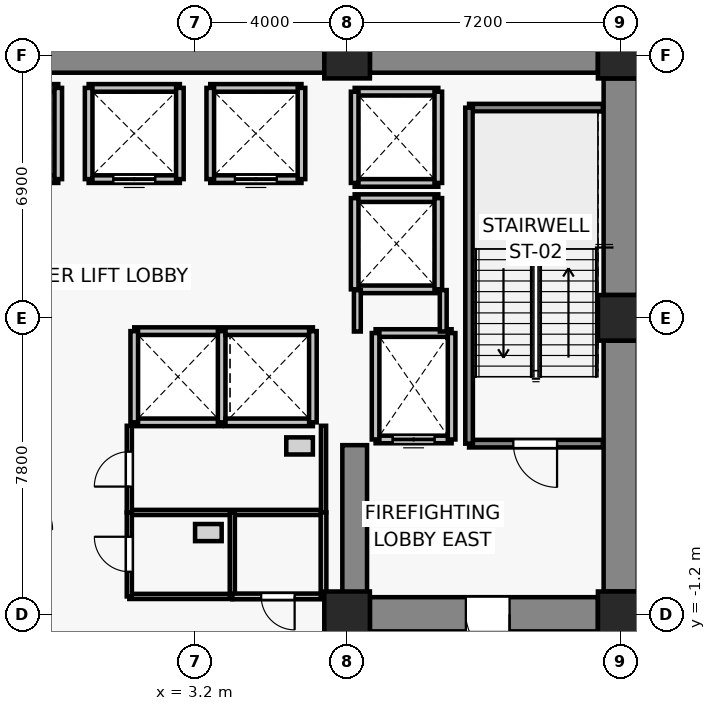
"""IFC4 building model, lengths in metres.
Left out: names, types, materials, properties, quantities, classifications, styles, units other than length and angle.
Written with IfcOpenShell. Run it as: python <this file> out.ifc"""

import sys

from ifc_helpers import new_model, si_unit, direction, frame, frame_2d, origin, origin_2d, place, context, subcontext, project, spatial, rectangle, extrude, source, transform, mapped, element, fill, save


model = new_model("IFC4")
c1 = context("Model", 3, precision=1e-05, world=origin(), true_north=direction((0.0, 1.0)))
c2 = subcontext(c1, "Body", "Model", "MODEL_VIEW")
j1 = project(units=[si_unit("LENGTHUNIT", "METRE"), si_unit("PLANEANGLEUNIT", "RADIAN")], contexts=[c1])
p1 = place(None, origin())
s1 = spatial("IfcSite", under=j1, at=p1, CompositionType="ELEMENT")
p2 = place(p1, origin())
s2 = spatial("IfcBuilding", under=s1, at=p2, CompositionType="ELEMENT")
p3 = place(p2, frame((0.0, 0.0, 5.0)))
s3 = spatial("IfcBuildingStorey", under=s2, at=p3, CompositionType="ELEMENT", Elevation=5.0)
for number, where, z_axis, x_axis in (
    (1, (7.2, -1.2, 0.0), (0.0, 0.0, 1.0), (1.0, 0.0, 0.0)),
    (2, (14.4, -1.2, 0.0), (0.0, 0.0, 1.0), (1.0, 0.0, 0.0)),
    (3, (14.4, 6.6, 0.0), (0.0, 0.0, 1.0), (1.0, 0.0, 0.0)),
    (4, (7.2, 13.5, 0.0), (0.0, 0.0, 1.0), (1.0, 0.0, 0.0)),
    (5, (14.4, 13.5, 0.0), (0.0, 0.0, 1.0), (1.0, 0.0, 0.0)),
):
    element("IfcColumn", number, at=place(p3, frame(where, z_axis=z_axis, x_axis=x_axis)), inside=s3, PredefinedType="COLUMN", context=c2, shape_type="SweptSolid", body=[
        extrude(rectangle(XDim=1.2, YDim=1.2, at=origin_2d()), origin(), (0.0, 0.0, 1.0), 4.4),
    ])
p4 = place(p3, frame((-6.6, 13.5, 0.0), z_axis=(0.0, 0.0, 1.0), x_axis=(1.0, 0.0, 0.0)))
e6 = element("IfcWall", 6, at=p4, inside=s3, PredefinedType="SHEAR", context=c2, shape_type="SweptSolid", body=[
    extrude(rectangle(XDim=13.2, YDim=0.9, at=frame_2d((6.6, 0.0))), origin(), (0.0, 0.0, 1.0), 4.1),
])
p5 = place(p3, frame((7.8, 13.5, 0.0), z_axis=(0.0, 0.0, 1.0), x_axis=(1.0, 0.0, 0.0)))
e7 = element("IfcWall", 7, at=p5, inside=s3, PredefinedType="SHEAR", context=c2, shape_type="SweptSolid", body=[
    extrude(rectangle(XDim=6.0, YDim=0.9, at=frame_2d((3.0, 0.0))), origin(), (0.0, 0.0, 1.0), 4.1),
])
p6 = place(p3, frame((14.4, -0.6, 0.0), z_axis=(0.0, 0.0, 1.0), x_axis=(0.0, 1.0, 0.0)))
e8 = element("IfcWall", 8, at=p6, inside=s3, PredefinedType="SHEAR", context=c2, shape_type="SweptSolid", body=[
    extrude(rectangle(XDim=6.6, YDim=0.9, at=frame_2d((3.3, 0.0))), origin(), (0.0, 0.0, 1.0), 4.1),
])
p7 = place(p3, frame((14.4, 7.2, 0.0), z_axis=(0.0, 0.0, 1.0), x_axis=(0.0, 1.0, 0.0)))
e9 = element("IfcWall", 9, at=p7, inside=s3, PredefinedType="SHEAR", context=c2, shape_type="SweptSolid", body=[
    extrude(rectangle(XDim=5.7, YDim=0.9, at=frame_2d((2.85, 0.0))), origin(), (0.0, 0.0, 1.0), 4.1),
])
p8 = place(p3, frame((13.8, -1.2, 0.0), z_axis=(0.0, 0.0, 1.0), x_axis=(-1.0, 0.0, 0.0)))
e10 = element("IfcWall", 10, at=p8, inside=s3, PredefinedType="SHEAR", context=c2, shape_type="SweptSolid", body=[
    extrude(rectangle(XDim=6.0, YDim=0.9, at=frame_2d((3.0, 0.0))), origin(), (0.0, 0.0, 1.0), 4.1),
])
p9 = place(p8, frame((2.325, 0.0, 0.0)))
e11 = element("IfcOpeningElement", 11, at=p9, cuts=e10, PredefinedType="OPENING", context=c2, shape_type="SweptSolid", body=[
    extrude(rectangle(XDim=1.15, YDim=2.15, at=frame_2d((0.575, 1.075))), frame((0.0, 0.46, 0.0), z_axis=(0.0, -1.0, 0.0), x_axis=(1.0, 0.0, 0.0)), (0.0, 0.0, 1.0), 0.92),
])
p10 = place(p3, frame((7.4, -0.75, 0.0), z_axis=(0.0, 0.0, 1.0), x_axis=(0.0, 1.0, 0.0)))
e12 = element("IfcWall", 12, at=p10, inside=s3, PredefinedType="SHEAR", context=c2, shape_type="SweptSolid", body=[
    extrude(rectangle(XDim=4.0, YDim=0.65, at=frame_2d((2.0, 0.0))), origin(), (0.0, 0.0, 1.0), 4.1),
])
p11 = place(p3, frame((9.95, 3.4, 0.0), z_axis=(0.0, 0.0, 1.0), x_axis=(-1.0, 0.0, 0.0)))
e13 = element("IfcWall", 13, at=p11, inside=s3, PredefinedType="SOLIDWALL", context=c2, shape_type="SweptSolid", body=[
    extrude(rectangle(XDim=2.0, YDim=0.2, at=frame_2d((1.0, 0.0))), origin(), (0.0, 0.0, 1.0), 4.1),
])
p12 = place(p11, frame((0.45, 0.0, 0.0)))
e14 = element("IfcOpeningElement", 14, at=p12, cuts=e13, PredefinedType="OPENING", context=c2, shape_type="SweptSolid", body=[
    extrude(rectangle(XDim=1.1, YDim=2.2, at=frame_2d((0.55, 1.1))), frame((0.0, 0.11, 0.0), z_axis=(0.0, -1.0, 0.0), x_axis=(1.0, 0.0, 0.0)), (0.0, 0.0, 1.0), 0.22),
])
p13 = place(p3, frame((7.95, 6.2, 0.0), z_axis=(0.0, 0.0, 1.0), x_axis=(1.0, 0.0, 0.0)))
e15 = element("IfcWall", 15, at=p13, inside=s3, PredefinedType="SOLIDWALL", context=c2, shape_type="SweptSolid", body=[
    extrude(rectangle(XDim=2.0, YDim=0.2, at=frame_2d((1.0, 0.0))), origin(), (0.0, 0.0, 1.0), 4.1),
])
for number, where, z_axis, x_axis in (
    (16, (7.95, 3.4, 0.0), (0.0, 0.0, 1.0), (0.0, 1.0, 0.0)),
    (17, (9.95, 6.2, 0.0), (0.0, 0.0, 1.0), (0.0, -1.0, 0.0)),
):
    element("IfcWall", number, at=place(p3, frame(where, z_axis=z_axis, x_axis=x_axis)), inside=s3, PredefinedType="SOLIDWALL", context=c2, shape_type="SweptSolid", body=[
        extrude(rectangle(XDim=2.8, YDim=0.2, at=frame_2d((1.4, 0.0))), origin(), (0.0, 0.0, 1.0), 4.1),
    ])
p14 = place(p3, frame((-0.4, 10.25, 0.0), z_axis=(0.0, 0.0, 1.0), x_axis=(-1.0, 0.0, 0.0)))
e18 = element("IfcWall", 18, at=p14, inside=s3, PredefinedType="SOLIDWALL", context=c2, shape_type="SweptSolid", body=[
    extrude(rectangle(XDim=2.4, YDim=0.2, at=frame_2d((1.2, 0.0))), origin(), (0.0, 0.0, 1.0), 4.1),
])
p15 = place(p14, frame((0.65, 0.0, 0.0)))
e19 = element("IfcOpeningElement", 19, at=p15, cuts=e18, PredefinedType="OPENING", context=c2, shape_type="SweptSolid", body=[
    extrude(rectangle(XDim=1.1, YDim=2.2, at=frame_2d((0.55, 1.1))), frame((0.0, 0.11, 0.0), z_axis=(0.0, -1.0, 0.0), x_axis=(1.0, 0.0, 0.0)), (0.0, 0.0, 1.0), 0.22),
])
p16 = place(p3, frame((-2.8, 12.65, 0.0), z_axis=(0.0, 0.0, 1.0), x_axis=(1.0, 0.0, 0.0)))
e20 = element("IfcWall", 20, at=p16, inside=s3, PredefinedType="SOLIDWALL", context=c2, shape_type="SweptSolid", body=[
    extrude(rectangle(XDim=2.4, YDim=0.2, at=frame_2d((1.2, 0.0))), origin(), (0.0, 0.0, 1.0), 4.1),
])
p17 = place(p3, frame((-0.4, 12.65, 0.0), z_axis=(0.0, 0.0, 1.0), x_axis=(0.0, -1.0, 0.0)))
e21 = element("IfcWall", 21, at=p17, inside=s3, PredefinedType="SOLIDWALL", context=c2, shape_type="SweptSolid", body=[
    extrude(rectangle(XDim=2.4, YDim=0.2, at=frame_2d((1.2, 0.0))), origin(), (0.0, 0.0, 1.0), 4.1),
])
p18 = place(p3, frame((2.8, 10.25, 0.0), z_axis=(0.0, 0.0, 1.0), x_axis=(-1.0, 0.0, 0.0)))
e22 = element("IfcWall", 22, at=p18, inside=s3, PredefinedType="SOLIDWALL", context=c2, shape_type="SweptSolid", body=[
    extrude(rectangle(XDim=2.4, YDim=0.2, at=frame_2d((1.2, 0.0))), origin(), (0.0, 0.0, 1.0), 4.1),
])
p19 = place(p18, frame((0.65, 0.0, 0.0)))
e23 = element("IfcOpeningElement", 23, at=p19, cuts=e22, PredefinedType="OPENING", context=c2, shape_type="SweptSolid", body=[
    extrude(rectangle(XDim=1.1, YDim=2.2, at=frame_2d((0.55, 1.1))), frame((0.0, 0.11, 0.0), z_axis=(0.0, -1.0, 0.0), x_axis=(1.0, 0.0, 0.0)), (0.0, 0.0, 1.0), 0.22),
])
p20 = place(p3, frame((0.4, 12.65, 0.0), z_axis=(0.0, 0.0, 1.0), x_axis=(1.0, 0.0, 0.0)))
e24 = element("IfcWall", 24, at=p20, inside=s3, PredefinedType="SOLIDWALL", context=c2, shape_type="SweptSolid", body=[
    extrude(rectangle(XDim=2.4, YDim=0.2, at=frame_2d((1.2, 0.0))), origin(), (0.0, 0.0, 1.0), 4.1),
])
for number, where, z_axis, x_axis in (
    (25, (0.4, 10.25, 0.0), (0.0, 0.0, 1.0), (0.0, 1.0, 0.0)),
    (26, (2.8, 12.65, 0.0), (0.0, 0.0, 1.0), (0.0, -1.0, 0.0)),
):
    element("IfcWall", number, at=place(p3, frame(where, z_axis=z_axis, x_axis=x_axis)), inside=s3, PredefinedType="SOLIDWALL", context=c2, shape_type="SweptSolid", body=[
        extrude(rectangle(XDim=2.4, YDim=0.2, at=frame_2d((1.2, 0.0))), origin(), (0.0, 0.0, 1.0), 4.1),
    ])
p21 = place(p3, frame((6.0, 10.25, 0.0), z_axis=(0.0, 0.0, 1.0), x_axis=(-1.0, 0.0, 0.0)))
e27 = element("IfcWall", 27, at=p21, inside=s3, PredefinedType="SOLIDWALL", context=c2, shape_type="SweptSolid", body=[
    extrude(rectangle(XDim=2.4, YDim=0.2, at=frame_2d((1.2, 0.0))), origin(), (0.0, 0.0, 1.0), 4.1),
])
p22 = place(p21, frame((0.65, 0.0, 0.0)))
e28 = element("IfcOpeningElement", 28, at=p22, cuts=e27, PredefinedType="OPENING", context=c2, shape_type="SweptSolid", body=[
    extrude(rectangle(XDim=1.1, YDim=2.2, at=frame_2d((0.55, 1.1))), frame((0.0, 0.11, 0.0), z_axis=(0.0, -1.0, 0.0), x_axis=(1.0, 0.0, 0.0)), (0.0, 0.0, 1.0), 0.22),
])
for number, where, z_axis, x_axis in (
    (29, (3.6, 12.65, 0.0), (0.0, 0.0, 1.0), (1.0, 0.0, 0.0)),
    (30, (3.6, 10.25, 0.0), (0.0, 0.0, 1.0), (0.0, 1.0, 0.0)),
    (31, (6.0, 12.65, 0.0), (0.0, 0.0, 1.0), (0.0, -1.0, 0.0)),
):
    element("IfcWall", number, at=place(p3, frame(where, z_axis=z_axis, x_axis=x_axis)), inside=s3, PredefinedType="SOLIDWALL", context=c2, shape_type="SweptSolid", body=[
        extrude(rectangle(XDim=2.4, YDim=0.2, at=frame_2d((1.2, 0.0))), origin(), (0.0, 0.0, 1.0), 4.1),
    ])
for number, where, z_axis, x_axis in (
    (32, (3.9, 3.85, 0.0), (0.0, 0.0, 1.0), (-1.0, 0.0, 0.0)),
    (33, (1.6, 6.25, 0.0), (0.0, 0.0, 1.0), (1.0, 0.0, 0.0)),
):
    element("IfcWall", number, at=place(p3, frame(where, z_axis=z_axis, x_axis=x_axis)), inside=s3, PredefinedType="SOLIDWALL", context=c2, shape_type="SweptSolid", body=[
        extrude(rectangle(XDim=2.3, YDim=0.2, at=frame_2d((1.15, 0.0))), origin(), (0.0, 0.0, 1.0), 4.1),
    ])
for number, where, z_axis, x_axis in (
    (34, (1.6, 3.85, 0.0), (0.0, 0.0, 1.0), (0.0, 1.0, 0.0)),
    (35, (3.9, 6.25, 0.0), (0.0, 0.0, 1.0), (0.0, -1.0, 0.0)),
):
    element("IfcWall", number, at=place(p3, frame(where, z_axis=z_axis, x_axis=x_axis)), inside=s3, PredefinedType="SOLIDWALL", context=c2, shape_type="SweptSolid", body=[
        extrude(rectangle(XDim=2.4, YDim=0.2, at=frame_2d((1.2, 0.0))), origin(), (0.0, 0.0, 1.0), 4.1),
    ])
for number, where, z_axis, x_axis in (
    (36, (6.3, 3.85, 0.0), (0.0, 0.0, 1.0), (-1.0, 0.0, 0.0)),
    (37, (4.0, 6.25, 0.0), (0.0, 0.0, 1.0), (1.0, 0.0, 0.0)),
):
    element("IfcWall", number, at=place(p3, frame(where, z_axis=z_axis, x_axis=x_axis)), inside=s3, PredefinedType="SOLIDWALL", context=c2, shape_type="SweptSolid", body=[
        extrude(rectangle(XDim=2.3, YDim=0.2, at=frame_2d((1.15, 0.0))), origin(), (0.0, 0.0, 1.0), 4.1),
    ])
p23 = place(p3, frame((6.3, 6.25, 0.0), z_axis=(0.0, 0.0, 1.0), x_axis=(0.0, -1.0, 0.0)))
e38 = element("IfcWall", 38, at=p23, inside=s3, PredefinedType="SOLIDWALL", context=c2, shape_type="SweptSolid", body=[
    extrude(rectangle(XDim=2.4, YDim=0.2, at=frame_2d((1.2, 0.0))), origin(), (0.0, 0.0, 1.0), 4.1),
])
for number, where, z_axis, x_axis in (
    (39, (9.6, 7.35, 0.0), (0.0, 0.0, 1.0), (-1.0, 0.0, 0.0)),
    (40, (7.4, 9.75, 0.0), (0.0, 0.0, 1.0), (1.0, 0.0, 0.0)),
):
    element("IfcWall", number, at=place(p3, frame(where, z_axis=z_axis, x_axis=x_axis)), inside=s3, PredefinedType="SOLIDWALL", context=c2, shape_type="SweptSolid", body=[
        extrude(rectangle(XDim=2.2, YDim=0.2, at=frame_2d((1.1, 0.0))), origin(), (0.0, 0.0, 1.0), 3.19),
    ])
p24 = place(p3, frame((7.4, 7.35, 0.0), z_axis=(0.0, 0.0, 1.0), x_axis=(0.0, 1.0, 0.0)))
e41 = element("IfcWall", 41, at=p24, inside=s3, PredefinedType="SOLIDWALL", context=c2, shape_type="SweptSolid", body=[
    extrude(rectangle(XDim=2.4, YDim=0.2, at=frame_2d((1.2, 0.0))), origin(), (0.0, 0.0, 1.0), 3.19),
])
p25 = place(p3, frame((9.6, 9.75, 0.0), z_axis=(0.0, 0.0, 1.0), x_axis=(0.0, -1.0, 0.0)))
e42 = element("IfcWall", 42, at=p25, inside=s3, PredefinedType="SOLIDWALL", context=c2, shape_type="SweptSolid", body=[
    extrude(rectangle(XDim=2.4, YDim=0.2, at=frame_2d((1.2, 0.0))), origin(), (0.0, 0.0, 1.0), 4.1),
])
for number, where, z_axis, x_axis in (
    (43, (9.6, 10.15, 0.0), (0.0, 0.0, 1.0), (-1.0, 0.0, 0.0)),
    (44, (7.4, 12.55, 0.0), (0.0, 0.0, 1.0), (1.0, 0.0, 0.0)),
):
    element("IfcWall", number, at=place(p3, frame(where, z_axis=z_axis, x_axis=x_axis)), inside=s3, PredefinedType="SOLIDWALL", context=c2, shape_type="SweptSolid", body=[
        extrude(rectangle(XDim=2.2, YDim=0.2, at=frame_2d((1.1, 0.0))), origin(), (0.0, 0.0, 1.0), 3.19),
    ])
p26 = place(p3, frame((7.4, 10.15, 0.0), z_axis=(0.0, 0.0, 1.0), x_axis=(0.0, 1.0, 0.0)))
e45 = element("IfcWall", 45, at=p26, inside=s3, PredefinedType="SOLIDWALL", context=c2, shape_type="SweptSolid", body=[
    extrude(rectangle(XDim=2.4, YDim=0.2, at=frame_2d((1.2, 0.0))), origin(), (0.0, 0.0, 1.0), 3.19),
])
p27 = place(p3, frame((9.6, 12.55, 0.0), z_axis=(0.0, 0.0, 1.0), x_axis=(0.0, -1.0, 0.0)))
e46 = element("IfcWall", 46, at=p27, inside=s3, PredefinedType="SOLIDWALL", context=c2, shape_type="SweptSolid", body=[
    extrude(rectangle(XDim=2.4, YDim=0.2, at=frame_2d((1.2, 0.0))), origin(), (0.0, 0.0, 1.0), 4.1),
])
p28 = place(p3, frame((13.93, 3.29, 0.0), z_axis=(0.0, 0.0, 1.0), x_axis=(-1.0, 0.0, 0.0)))
e47 = element("IfcWall", 47, at=p28, inside=s3, PredefinedType="SOLIDWALL", context=c2, shape_type="SweptSolid", body=[
    extrude(rectangle(XDim=3.52, YDim=0.2, at=frame_2d((1.76, 0.0))), origin(), (0.0, 0.0, 1.0), 4.1),
])
p29 = place(p28, frame((1.205, 0.0, 0.0)))
e48 = element("IfcOpeningElement", 48, at=p29, cuts=e47, PredefinedType="OPENING", context=c2, shape_type="SweptSolid", body=[
    extrude(rectangle(XDim=1.15, YDim=2.15, at=frame_2d((0.575, 1.075))), frame((0.0, 0.11, 0.0), z_axis=(0.0, -1.0, 0.0), x_axis=(1.0, 0.0, 0.0)), (0.0, 0.0, 1.0), 0.22),
])
p30 = place(p3, frame((10.41, 12.13, 0.0), z_axis=(0.0, 0.0, 1.0), x_axis=(1.0, 0.0, 0.0)))
e49 = element("IfcWall", 49, at=p30, inside=s3, PredefinedType="SOLIDWALL", context=c2, shape_type="SweptSolid", body=[
    extrude(rectangle(XDim=3.52, YDim=0.2, at=frame_2d((1.76, 0.0))), origin(), (0.0, 0.0, 1.0), 4.1),
])
p31 = place(p3, frame((10.41, 3.29, 0.0), z_axis=(0.0, 0.0, 1.0), x_axis=(0.0, 1.0, 0.0)))
e50 = element("IfcWall", 50, at=p31, inside=s3, PredefinedType="SOLIDWALL", context=c2, shape_type="SweptSolid", body=[
    extrude(rectangle(XDim=8.84, YDim=0.2, at=frame_2d((4.42, 0.0))), origin(), (0.0, 0.0, 1.0), 4.1),
])
p32 = place(p3, frame((7.47, 6.24, 0.0), z_axis=(0.0, 0.0, 1.0), x_axis=(0.0, 1.0, 0.0)))
e51 = element("IfcWall", 51, at=p32, inside=s3, PredefinedType="PARTITIONING", context=c2, shape_type="SweptSolid", body=[
    extrude(rectangle(XDim=1.09, YDim=0.18, at=frame_2d((0.545, 0.0))), origin(), (0.0, 0.0, 1.0), 3.19),
])
p33 = place(p3, frame((9.73, 7.33, 0.0), z_axis=(0.0, 0.0, 1.0), x_axis=(0.0, -1.0, 0.0)))
e52 = element("IfcWall", 52, at=p33, inside=s3, PredefinedType="PARTITIONING", context=c2, shape_type="SweptSolid", body=[
    extrude(rectangle(XDim=1.09, YDim=0.18, at=frame_2d((0.545, 0.0))), origin(), (0.0, 0.0, 1.0), 4.1),
])
p34 = place(p3, frame((6.58, 1.48, 0.0), z_axis=(0.0, 0.0, 1.0), x_axis=(-1.0, 0.0, 0.0)))
e53 = element("IfcWall", 53, at=p34, inside=s3, PredefinedType="PARTITIONING", context=c2, shape_type="SweptSolid", body=[
    extrude(rectangle(XDim=5.11, YDim=0.135, at=frame_2d((2.555, 0.0))), origin(), (0.0, 0.0, 1.0), 4.1),
])
p35 = place(p3, frame((1.47, 1.48, 0.0), z_axis=(0.0, 0.0, 1.0), x_axis=(0.0, 1.0, 0.0)))
e54 = element("IfcWall", 54, at=p35, inside=s3, PredefinedType="PARTITIONING", context=c2, shape_type="SweptSolid", body=[
    extrude(rectangle(XDim=2.28, YDim=0.135, at=frame_2d((1.14, 0.0))), origin(), (0.0, 0.0, 1.0), 3.473),
])
p36 = place(p35, frame((0.68, 0.0, 0.0)))
e55 = element("IfcOpeningElement", 55, at=p36, cuts=e54, PredefinedType="OPENING", context=c2, shape_type="SweptSolid", body=[
    extrude(rectangle(XDim=0.92, YDim=2.1, at=frame_2d((0.46, 1.05))), frame((0.0, 0.077, 0.0), z_axis=(0.0, -1.0, 0.0), x_axis=(1.0, 0.0, 0.0)), (0.0, 0.0, 1.0), 0.155),
])
p37 = place(p3, frame((6.58, 3.76, 0.0), z_axis=(0.0, 0.0, 1.0), x_axis=(0.0, -1.0, 0.0)))
e56 = element("IfcWall", 56, at=p37, inside=s3, PredefinedType="PARTITIONING", context=c2, shape_type="SweptSolid", body=[
    extrude(rectangle(XDim=2.28, YDim=0.135, at=frame_2d((1.14, 0.0))), origin(), (0.0, 0.0, 1.0), 3.473),
])
p38 = place(p3, frame((4.18, -0.73, 0.0), z_axis=(0.0, 0.0, 1.0), x_axis=(-1.0, 0.0, 0.0)))
e57 = element("IfcWall", 57, at=p38, inside=s3, PredefinedType="PARTITIONING", context=c2, shape_type="SweptSolid", body=[
    extrude(rectangle(XDim=2.71, YDim=0.135, at=frame_2d((1.355, 0.0))), origin(), (0.0, 0.0, 1.0), 4.1),
])
p39 = place(p3, frame((1.47, -0.73, 0.0), z_axis=(0.0, 0.0, 1.0), x_axis=(0.0, 1.0, 0.0)))
e58 = element("IfcWall", 58, at=p39, inside=s3, PredefinedType="PARTITIONING", context=c2, shape_type="SweptSolid", body=[
    extrude(rectangle(XDim=2.21, YDim=0.135, at=frame_2d((1.105, 0.0))), origin(), (0.0, 0.0, 1.0), 4.1),
])
p40 = place(p39, frame((0.65, 0.0, 0.0)))
e59 = element("IfcOpeningElement", 59, at=p40, cuts=e58, PredefinedType="OPENING", context=c2, shape_type="SweptSolid", body=[
    extrude(rectangle(XDim=0.92, YDim=2.1, at=frame_2d((0.46, 1.05))), frame((0.0, 0.077, 0.0), z_axis=(0.0, -1.0, 0.0), x_axis=(1.0, 0.0, 0.0)), (0.0, 0.0, 1.0), 0.155),
])
p41 = place(p3, frame((4.18, 1.48, 0.0), z_axis=(0.0, 0.0, 1.0), x_axis=(0.0, -1.0, 0.0)))
e60 = element("IfcWall", 60, at=p41, inside=s3, PredefinedType="PARTITIONING", context=c2, shape_type="SweptSolid", body=[
    extrude(rectangle(XDim=2.21, YDim=0.135, at=frame_2d((1.105, 0.0))), origin(), (0.0, 0.0, 1.0), 4.1),
])
p42 = place(p3, frame((6.58, -0.73, 0.0), z_axis=(0.0, 0.0, 1.0), x_axis=(-1.0, 0.0, 0.0)))
e61 = element("IfcWall", 61, at=p42, inside=s3, PredefinedType="PARTITIONING", context=c2, shape_type="SweptSolid", body=[
    extrude(rectangle(XDim=2.4, YDim=0.15, at=frame_2d((1.2, 0.0))), origin(), (0.0, 0.0, 1.0), 4.1),
])
p43 = place(p42, frame((0.76, 0.0, 0.0)))
e62 = element("IfcOpeningElement", 62, at=p43, cuts=e61, PredefinedType="OPENING", context=c2, shape_type="SweptSolid", body=[
    extrude(rectangle(XDim=0.88, YDim=2.1, at=frame_2d((0.44, 1.05))), frame((0.0, 0.085, 0.0), z_axis=(0.0, -1.0, 0.0), x_axis=(1.0, 0.0, 0.0)), (0.0, 0.0, 1.0), 0.17),
])
p44 = place(p3, frame((6.58, 1.48, 0.0), z_axis=(0.0, 0.0, 1.0), x_axis=(0.0, -1.0, 0.0)))
e63 = element("IfcWall", 63, at=p44, inside=s3, PredefinedType="PARTITIONING", context=c2, shape_type="SweptSolid", body=[
    extrude(rectangle(XDim=2.21, YDim=0.15, at=frame_2d((1.105, 0.0))), origin(), (0.0, 0.0, 1.0), 4.1),
])
m1 = source(origin(), c2, "Body", "SweptSolid", [
    extrude(rectangle(XDim=1.1, YDim=2.2, at=frame_2d((0.55, 1.1))), frame((0.0, 0.025, 0.0), z_axis=(0.0, -1.0, 0.0), x_axis=(1.0, 0.0, 0.0)), (0.0, 0.0, 1.0), 0.05),
])
p45 = place(p12, origin())
e64 = element("IfcDoor", 64, at=p45, inside=s3, OperationType="DOUBLE_DOOR_SLIDING", PredefinedType="DOOR", context=c2, shape_type="MappedRepresentation", body=[
    mapped(m1, transform((0.0, 0.0, 0.0), x_axis=(1.0, 0.0, 0.0), y_axis=(0.0, 1.0, 0.0), z_axis=(0.0, 0.0, 1.0), scale=1.0)),
])
fill(e14, e64)
p46 = place(p19, origin())
e65 = element("IfcDoor", 65, at=p46, inside=s3, OperationType="DOUBLE_DOOR_SLIDING", PredefinedType="DOOR", context=c2, shape_type="MappedRepresentation", body=[
    mapped(m1, transform((0.0, 0.0, 0.0), x_axis=(1.0, 0.0, 0.0), y_axis=(0.0, 1.0, 0.0), z_axis=(0.0, 0.0, 1.0), scale=1.0)),
])
fill(e23, e65)
p47 = place(p22, origin())
e66 = element("IfcDoor", 66, at=p47, inside=s3, OperationType="DOUBLE_DOOR_SLIDING", PredefinedType="DOOR", context=c2, shape_type="MappedRepresentation", body=[
    mapped(m1, transform((0.0, 0.0, 0.0), x_axis=(1.0, 0.0, 0.0), y_axis=(0.0, 1.0, 0.0), z_axis=(0.0, 0.0, 1.0), scale=1.0)),
])
fill(e28, e66)
m2 = source(origin(), c2, "Body", "SweptSolid", [
    extrude(rectangle(XDim=1.15, YDim=2.15, at=frame_2d((0.575, 1.075))), frame((0.0, 0.025, 0.0), z_axis=(0.0, -1.0, 0.0), x_axis=(1.0, 0.0, 0.0)), (0.0, 0.0, 1.0), 0.05),
])
p48 = place(p29, origin())
e67 = element("IfcDoor", 67, at=p48, inside=s3, OperationType="SINGLE_SWING_LEFT", PredefinedType="DOOR", context=c2, shape_type="MappedRepresentation", body=[
    mapped(m2, transform((0.0, 0.0, 0.0), x_axis=(1.0, 0.0, 0.0), y_axis=(0.0, 1.0, 0.0), z_axis=(0.0, 0.0, 1.0), scale=1.0)),
])
fill(e48, e67)
p49 = place(p9, origin())
e68 = element("IfcDoor", 68, at=p49, inside=s3, OperationType="SINGLE_SWING_LEFT", PredefinedType="DOOR", context=c2, shape_type="MappedRepresentation", body=[
    mapped(m2, transform((0.0, 0.0, 0.0), x_axis=(1.0, 0.0, 0.0), y_axis=(0.0, 1.0, 0.0), z_axis=(0.0, 0.0, 1.0), scale=1.0)),
])
fill(e11, e68)
m3 = source(origin(), c2, "Body", "SweptSolid", [
    extrude(rectangle(XDim=0.92, YDim=2.1, at=frame_2d((0.46, 1.05))), frame((0.0, 0.025, 0.0), z_axis=(0.0, -1.0, 0.0), x_axis=(1.0, 0.0, 0.0)), (0.0, 0.0, 1.0), 0.05),
])
p50 = place(p36, origin())
e69 = element("IfcDoor", 69, at=p50, inside=s3, OperationType="SINGLE_SWING_LEFT", PredefinedType="DOOR", context=c2, shape_type="MappedRepresentation", body=[
    mapped(m3, transform((0.0, 0.0, 0.0), x_axis=(1.0, 0.0, 0.0), y_axis=(0.0, 1.0, 0.0), z_axis=(0.0, 0.0, 1.0), scale=1.0)),
])
fill(e55, e69)
p51 = place(p40, origin())
e70 = element("IfcDoor", 70, at=p51, inside=s3, OperationType="SINGLE_SWING_RIGHT", PredefinedType="DOOR", context=c2, shape_type="MappedRepresentation", body=[
    mapped(m3, transform((0.0, 0.0, 0.0), x_axis=(1.0, 0.0, 0.0), y_axis=(0.0, 1.0, 0.0), z_axis=(0.0, 0.0, 1.0), scale=1.0)),
])
fill(e59, e70)
m4 = source(origin(), c2, "Body", "SweptSolid", [
    extrude(rectangle(XDim=0.88, YDim=2.1, at=frame_2d((0.44, 1.05))), frame((0.0, 0.025, 0.0), z_axis=(0.0, -1.0, 0.0), x_axis=(1.0, 0.0, 0.0)), (0.0, 0.0, 1.0), 0.05),
])
p52 = place(p43, origin())
e71 = element("IfcDoor", 71, at=p52, inside=s3, OperationType="SINGLE_SWING_LEFT", PredefinedType="DOOR", context=c2, shape_type="MappedRepresentation", body=[
    mapped(m4, transform((0.0, 0.0, 0.0), x_axis=(1.0, 0.0, 0.0), y_axis=(0.0, 1.0, 0.0), z_axis=(0.0, 0.0, 1.0), scale=1.0)),
])
fill(e62, e71)
save(model, sys.argv[1])
